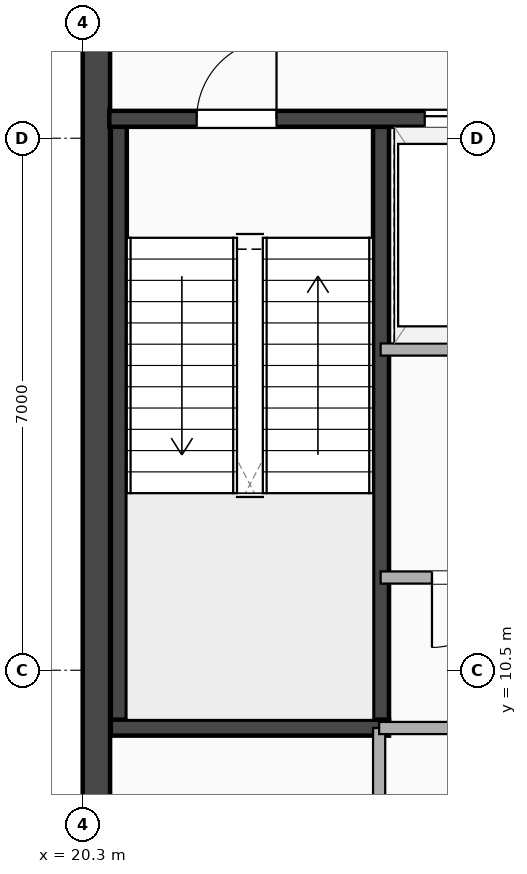
"""IFC4 building model, lengths in metres.
Left out: names, types, materials, properties, quantities, classifications, styles, units other than length and angle.
Written with IfcOpenShell. Run it as: python <this file> out.ifc"""

import sys

from ifc_helpers import new_model, si_unit, direction, frame, frame_2d, origin, place, context, subcontext, project, spatial, rectangle, extrude, element, fill, save


model = new_model("IFC4")
c1 = context("Model", 3, precision=1e-05, world=origin(), true_north=direction((0.0, 1.0)))
c2 = subcontext(c1, "Body", "Model", "MODEL_VIEW")
j1 = project(units=[si_unit("LENGTHUNIT", "METRE"), si_unit("PLANEANGLEUNIT", "RADIAN")], contexts=[c1])
p1 = place(None, origin())
s1 = spatial("IfcSite", under=j1, at=p1, CompositionType="ELEMENT")
p2 = place(p1, origin())
s2 = spatial("IfcBuilding", under=s1, at=p2, CompositionType="ELEMENT")
p3 = place(p2, frame((0.0, 0.0, 312.5)))
s3 = spatial("IfcBuildingStorey", under=s2, at=p3, CompositionType="ELEMENT", Elevation=312.5)
p4 = place(p3, frame((20.48, 3.5, 0.0), z_axis=(0.0, 0.0, 1.0), x_axis=(0.0, 1.0, 0.0)))
e1 = element("IfcWall", 1, at=p4, inside=s3, PredefinedType="SHEAR", context=c2, shape_type="SweptSolid", body=[
    extrude(rectangle(XDim=21.2, YDim=0.36, at=frame_2d((10.6, 0.0))), origin(), (0.0, 0.0, 1.0), 4.3),
])
for number, where, z_axis, x_axis in (
    (2, (20.775, 9.745, 0.0), (0.0, 0.0, 1.0), (0.0, 1.0, 0.0)),
    (3, (24.225, 9.745, 0.0), (0.0, 0.0, 1.0), (0.0, 1.0, 0.0)),
):
    element("IfcWall", number, at=place(p3, frame(where, z_axis=z_axis, x_axis=x_axis)), inside=s3, PredefinedType="SHEAR", context=c2, shape_type="SweptSolid", body=[
        extrude(rectangle(XDim=8.01, YDim=0.21, at=frame_2d((4.005, 0.0))), origin(), (0.0, 0.0, 1.0), 4.3),
    ])
p5 = place(p3, frame((20.67, 9.745, 0.0), z_axis=(0.0, 0.0, 1.0), x_axis=(1.0, 0.0, 0.0)))
e4 = element("IfcWall", 4, at=p5, inside=s3, PredefinedType="SHEAR", context=c2, shape_type="SweptSolid", body=[
    extrude(rectangle(XDim=3.66, YDim=0.21, at=frame_2d((1.83, 0.0))), origin(), (0.0, 0.0, 1.0), 4.3),
])
p6 = place(p3, frame((20.65, 17.755, 0.0), z_axis=(0.0, 0.0, 1.0), x_axis=(1.0, 0.0, 0.0)))
e5 = element("IfcWall", 5, at=p6, inside=s3, PredefinedType="SHEAR", context=c2, shape_type="SweptSolid", body=[
    extrude(rectangle(XDim=8.3, YDim=0.21, at=frame_2d((4.15, 0.0))), origin(), (0.0, 0.0, 1.0), 4.3),
])
p7 = place(p6, frame((2.2, 0.0, 0.0), z_axis=(0.0, 0.0, 1.0), x_axis=(-1.0, 0.0, 0.0)))
e6 = element("IfcOpeningElement", 6, at=p7, cuts=e5, PredefinedType="OPENING", context=c2, shape_type="SweptSolid", body=[
    extrude(rectangle(XDim=1.05, YDim=2.15, at=frame_2d((0.525, 1.075))), frame((0.0, 0.115, 0.0), z_axis=(0.0, -1.0, 0.0), x_axis=(1.0, 0.0, 0.0)), (0.0, 0.0, 1.0), 0.23),
])
p8 = place(p6, frame((4.15, 0.0, 0.0)))
e7 = element("IfcOpeningElement", 7, at=p8, cuts=e5, PredefinedType="OPENING", context=c2, shape_type="SweptSolid", body=[
    extrude(rectangle(XDim=1.1, YDim=2.18, at=frame_2d((0.55, 1.09))), frame((0.0, 0.115, 0.0), z_axis=(0.0, -1.0, 0.0), x_axis=(1.0, 0.0, 0.0)), (0.0, 0.0, 1.0), 0.23),
])
p9 = place(p3, frame((24.22, 14.72, 0.0), z_axis=(0.0, 0.0, 1.0), x_axis=(1.0, 0.0, 0.0)))
e8 = element("IfcWall", 8, at=p9, inside=s3, PredefinedType="PARTITIONING", context=c2, shape_type="SweptSolid", body=[
    extrude(rectangle(XDim=4.73, YDim=0.16, at=frame_2d((2.365, 0.0))), origin(), (0.0, 0.0, 1.0), 4.3),
])
p10 = place(p3, frame((24.22, 11.72, 0.0), z_axis=(0.0, 0.0, 1.0), x_axis=(1.0, 0.0, 0.0)))
e9 = element("IfcWall", 9, at=p10, inside=s3, PredefinedType="PARTITIONING", context=c2, shape_type="SweptSolid", body=[
    extrude(rectangle(XDim=2.271, YDim=0.16, at=frame_2d((1.135, 0.0))), origin(), (0.0, 0.0, 1.0), 4.3),
])
p11 = place(p10, frame((0.675, 0.0, 0.0)))
e10 = element("IfcOpeningElement", 10, at=p11, cuts=e9, PredefinedType="OPENING", context=c2, shape_type="SweptSolid", body=[
    extrude(rectangle(XDim=0.92, YDim=2.08, at=frame_2d((0.46, 1.04))), frame((0.0, 0.09, 0.0), z_axis=(0.0, -1.0, 0.0), x_axis=(1.0, 0.0, 0.0)), (0.0, 0.0, 1.0), 0.18),
])
p12 = place(p3, frame((24.2, 3.95, 0.0), z_axis=(0.0, 0.0, 1.0), x_axis=(0.0, 1.0, 0.0)))
e11 = element("IfcWall", 11, at=p12, inside=s3, PredefinedType="PARTITIONING", context=c2, shape_type="SweptSolid", body=[
    extrude(rectangle(XDim=5.79, YDim=0.16, at=frame_2d((2.895, 0.0))), origin(), (0.0, 0.0, 1.0), 4.3),
])
p13 = place(p12, frame((2.2, 0.0, 0.0)))
e12 = element("IfcOpeningElement", 12, at=p13, cuts=e11, PredefinedType="OPENING", context=c2, shape_type="SweptSolid", body=[
    extrude(rectangle(XDim=0.92, YDim=2.08, at=frame_2d((0.46, 1.04))), frame((0.0, 0.09, 0.0), z_axis=(0.0, -1.0, 0.0), x_axis=(1.0, 0.0, 0.0)), (0.0, 0.0, 1.0), 0.18),
])
p14 = place(p3, frame((24.2, 9.74, 0.0), z_axis=(0.0, 0.0, 1.0), x_axis=(1.0, 0.0, 0.0)))
e13 = element("IfcWall", 13, at=p14, inside=s3, PredefinedType="PARTITIONING", context=c2, shape_type="SweptSolid", body=[
    extrude(rectangle(XDim=4.8, YDim=0.16, at=frame_2d((2.4, 0.0))), origin(), (0.0, 0.0, 1.0), 4.3),
])
p15 = place(p14, frame((2.75, 0.0, 0.0), z_axis=(0.0, 0.0, 1.0), x_axis=(-1.0, 0.0, 0.0)))
e14 = element("IfcOpeningElement", 14, at=p15, cuts=e13, PredefinedType="OPENING", context=c2, shape_type="SweptSolid", body=[
    extrude(rectangle(XDim=0.95, YDim=2.15, at=frame_2d((0.475, 1.075))), frame((0.0, 0.09, 0.0), z_axis=(0.0, -1.0, 0.0), x_axis=(1.0, 0.0, 0.0)), (0.0, 0.0, 1.0), 0.18),
])
p16 = place(p7, origin())
e15 = element("IfcDoor", 15, at=p16, inside=s3, OperationType="SINGLE_SWING_RIGHT", PredefinedType="DOOR", context=c2, shape_type="SweptSolid", body=[
    extrude(rectangle(XDim=1.05, YDim=2.15, at=frame_2d((0.525, 1.075))), frame((0.0, 0.025, 0.0), z_axis=(0.0, -1.0, 0.0), x_axis=(1.0, 0.0, 0.0)), (0.0, 0.0, 1.0), 0.05),
])
fill(e6, e15)
p17 = place(p8, origin())
e16 = element("IfcDoor", 16, at=p17, inside=s3, OperationType="DOUBLE_DOOR_SLIDING", PredefinedType="DOOR", context=c2, shape_type="SweptSolid", body=[
    extrude(rectangle(XDim=1.1, YDim=2.18, at=frame_2d((0.55, 1.09))), frame((0.0, 0.025, 0.0), z_axis=(0.0, -1.0, 0.0), x_axis=(1.0, 0.0, 0.0)), (0.0, 0.0, 1.0), 0.05),
])
fill(e7, e16)
p18 = place(p11, origin())
e17 = element("IfcDoor", 17, at=p18, inside=s3, OperationType="SINGLE_SWING_LEFT", PredefinedType="DOOR", context=c2, shape_type="SweptSolid", body=[
    extrude(rectangle(XDim=0.92, YDim=2.08, at=frame_2d((0.46, 1.04))), frame((0.0, 0.025, 0.0), z_axis=(0.0, -1.0, 0.0), x_axis=(1.0, 0.0, 0.0)), (0.0, 0.0, 1.0), 0.05),
])
fill(e10, e17)
save(model, sys.argv[1])
